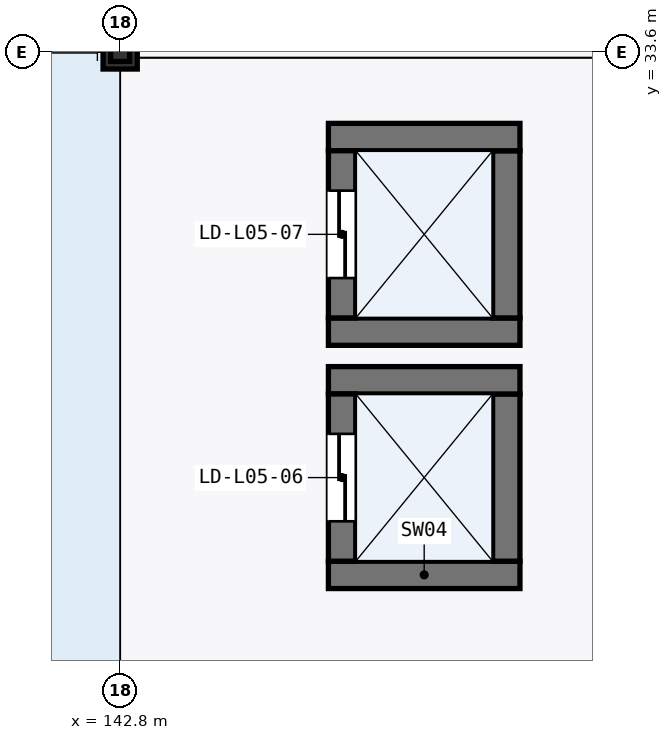
"""IFC4 building model, lengths in metres.
Left out: names, types, materials, properties, quantities, classifications, styles, units other than length and angle.
Written with IfcOpenShell. Run it as: python <this file> out.ifc"""

import sys

from ifc_helpers import new_model, si_unit, direction, frame, frame_2d, origin, origin_2d, place, context, subcontext, project, spatial, rectangle, hollow_rectangle, i_section, extrude, element, fill, save


model = new_model("IFC4")
c1 = context("Model", 3, precision=1e-05, world=origin(), true_north=direction((0.0, 1.0)))
c2 = subcontext(c1, "Body", "Model", "MODEL_VIEW")
j1 = project(units=[si_unit("LENGTHUNIT", "METRE"), si_unit("PLANEANGLEUNIT", "RADIAN")], contexts=[c1])
p1 = place(None, origin())
s1 = spatial("IfcSite", under=j1, at=p1, CompositionType="ELEMENT")
p2 = place(p1, origin())
s2 = spatial("IfcBuilding", under=s1, at=p2, CompositionType="ELEMENT")
p3 = place(p2, frame((0.0, 0.0, 21.6)))
s3 = spatial("IfcBuildingStorey", under=s2, at=p3, CompositionType="ELEMENT", Elevation=21.6)
p4 = place(p3, frame((142.8, 33.6, 0.0), z_axis=(0.0, 0.0, 1.0), x_axis=(1.0, 0.0, 0.0)))
e1 = element("IfcColumn", 1, at=p4, inside=s3, PredefinedType="COLUMN", context=c2, shape_type="SweptSolid", body=[
    extrude(hollow_rectangle(XDim=0.45, YDim=0.45, WallThickness=0.018, at=origin_2d()), origin(), (0.0, 0.0, 1.0), 5.1),
])
p5 = place(p3, frame((142.8, 33.6, 5.1), z_axis=(0.0, 0.0, 1.0), x_axis=(1.0, 0.0, 0.0)))
e2 = element("IfcColumn", 2, at=p5, inside=s3, PredefinedType="COLUMN", context=c2, shape_type="SweptSolid", body=[
    extrude(i_section(OverallWidth=0.25, OverallDepth=0.25, WebThickness=0.009, FlangeThickness=0.014, FilletRadius=0.016, at=origin_2d()), origin(), (0.0, 0.0, 1.0), 4.2),
])
p6 = place(p3, frame((145.54, 26.72, 0.0), z_axis=(0.0, 0.0, 1.0), x_axis=(1.0, 0.0, 0.0)))
e3 = element("IfcWall", 3, at=p6, inside=s3, PredefinedType="SHEAR", context=c2, shape_type="SweptSolid", body=[
    extrude(rectangle(XDim=2.52, YDim=0.36, at=frame_2d((1.26, 0.0))), origin(), (0.0, 0.0, 1.0), 4.095),
])
p7 = place(p3, frame((147.88, 26.9, 0.0), z_axis=(0.0, 0.0, 1.0), x_axis=(0.0, 1.0, 0.0)))
e4 = element("IfcWall", 4, at=p7, inside=s3, PredefinedType="SHEAR", context=c2, shape_type="SweptSolid", body=[
    extrude(rectangle(XDim=2.2, YDim=0.36, at=frame_2d((1.1, 0.0))), origin(), (0.0, 0.0, 1.0), 4.095),
])
p8 = place(p3, frame((148.06, 29.28, 0.0), z_axis=(0.0, 0.0, 1.0), x_axis=(-1.0, 0.0, 0.0)))
e5 = element("IfcWall", 5, at=p8, inside=s3, PredefinedType="SHEAR", context=c2, shape_type="SweptSolid", body=[
    extrude(rectangle(XDim=2.52, YDim=0.36, at=frame_2d((1.26, 0.0))), origin(), (0.0, 0.0, 1.0), 4.095),
])
p9 = place(p3, frame((145.72, 29.1, 0.0), z_axis=(0.0, 0.0, 1.0), x_axis=(0.0, -1.0, 0.0)))
e6 = element("IfcWall", 6, at=p9, inside=s3, PredefinedType="SHEAR", context=c2, shape_type="SweptSolid", body=[
    extrude(rectangle(XDim=2.2, YDim=0.36, at=frame_2d((1.1, 0.0))), origin(), (0.0, 0.0, 1.0), 4.095),
])
p10 = place(p9, frame((0.525, 0.0, 0.0)))
e7 = element("IfcOpeningElement", 7, at=p10, cuts=e6, PredefinedType="OPENING", context=c2, shape_type="SweptSolid", body=[
    extrude(rectangle(XDim=1.15, YDim=2.2, at=frame_2d((0.575, 1.1))), frame((0.0, 0.19, 0.0), z_axis=(0.0, -1.0, 0.0), x_axis=(1.0, 0.0, 0.0)), (0.0, 0.0, 1.0), 0.38),
])
p11 = place(p3, frame((145.54, 29.92, 0.0), z_axis=(0.0, 0.0, 1.0), x_axis=(1.0, 0.0, 0.0)))
e8 = element("IfcWall", 8, at=p11, inside=s3, PredefinedType="SHEAR", context=c2, shape_type="SweptSolid", body=[
    extrude(rectangle(XDim=2.52, YDim=0.36, at=frame_2d((1.26, 0.0))), origin(), (0.0, 0.0, 1.0), 4.095),
])
p12 = place(p3, frame((147.88, 30.1, 0.0), z_axis=(0.0, 0.0, 1.0), x_axis=(0.0, 1.0, 0.0)))
e9 = element("IfcWall", 9, at=p12, inside=s3, PredefinedType="SHEAR", context=c2, shape_type="SweptSolid", body=[
    extrude(rectangle(XDim=2.2, YDim=0.36, at=frame_2d((1.1, 0.0))), origin(), (0.0, 0.0, 1.0), 4.095),
])
p13 = place(p3, frame((148.06, 32.48, 0.0), z_axis=(0.0, 0.0, 1.0), x_axis=(-1.0, 0.0, 0.0)))
e10 = element("IfcWall", 10, at=p13, inside=s3, PredefinedType="SHEAR", context=c2, shape_type="SweptSolid", body=[
    extrude(rectangle(XDim=2.52, YDim=0.36, at=frame_2d((1.26, 0.0))), origin(), (0.0, 0.0, 1.0), 4.095),
])
p14 = place(p3, frame((145.72, 32.3, 0.0), z_axis=(0.0, 0.0, 1.0), x_axis=(0.0, -1.0, 0.0)))
e11 = element("IfcWall", 11, at=p14, inside=s3, PredefinedType="SHEAR", context=c2, shape_type="SweptSolid", body=[
    extrude(rectangle(XDim=2.2, YDim=0.36, at=frame_2d((1.1, 0.0))), origin(), (0.0, 0.0, 1.0), 4.095),
])
p15 = place(p14, frame((0.525, 0.0, 0.0)))
e12 = element("IfcOpeningElement", 12, at=p15, cuts=e11, PredefinedType="OPENING", context=c2, shape_type="SweptSolid", body=[
    extrude(rectangle(XDim=1.15, YDim=2.2, at=frame_2d((0.575, 1.1))), frame((0.0, 0.19, 0.0), z_axis=(0.0, -1.0, 0.0), x_axis=(1.0, 0.0, 0.0)), (0.0, 0.0, 1.0), 0.38),
])
p16 = place(p10, frame((1.15, 0.0, 0.0), z_axis=(0.0, 0.0, 1.0), x_axis=(-1.0, 0.0, 0.0)))
e13 = element("IfcDoor", 13, at=p16, inside=s3, OperationType="DOUBLE_DOOR_SLIDING", PredefinedType="DOOR", context=c2, shape_type="SweptSolid", body=[
    extrude(rectangle(XDim=1.15, YDim=2.2, at=frame_2d((0.575, 1.1))), frame((0.0, 0.025, 0.0), z_axis=(0.0, -1.0, 0.0), x_axis=(1.0, 0.0, 0.0)), (0.0, 0.0, 1.0), 0.05),
])
fill(e7, e13)
p17 = place(p15, frame((1.15, 0.0, 0.0), z_axis=(0.0, 0.0, 1.0), x_axis=(-1.0, 0.0, 0.0)))
e14 = element("IfcDoor", 14, at=p17, inside=s3, OperationType="DOUBLE_DOOR_SLIDING", PredefinedType="DOOR", context=c2, shape_type="SweptSolid", body=[
    extrude(rectangle(XDim=1.15, YDim=2.2, at=frame_2d((0.575, 1.1))), frame((0.0, 0.025, 0.0), z_axis=(0.0, -1.0, 0.0), x_axis=(1.0, 0.0, 0.0)), (0.0, 0.0, 1.0), 0.05),
])
fill(e12, e14)
save(model, sys.argv[1])
